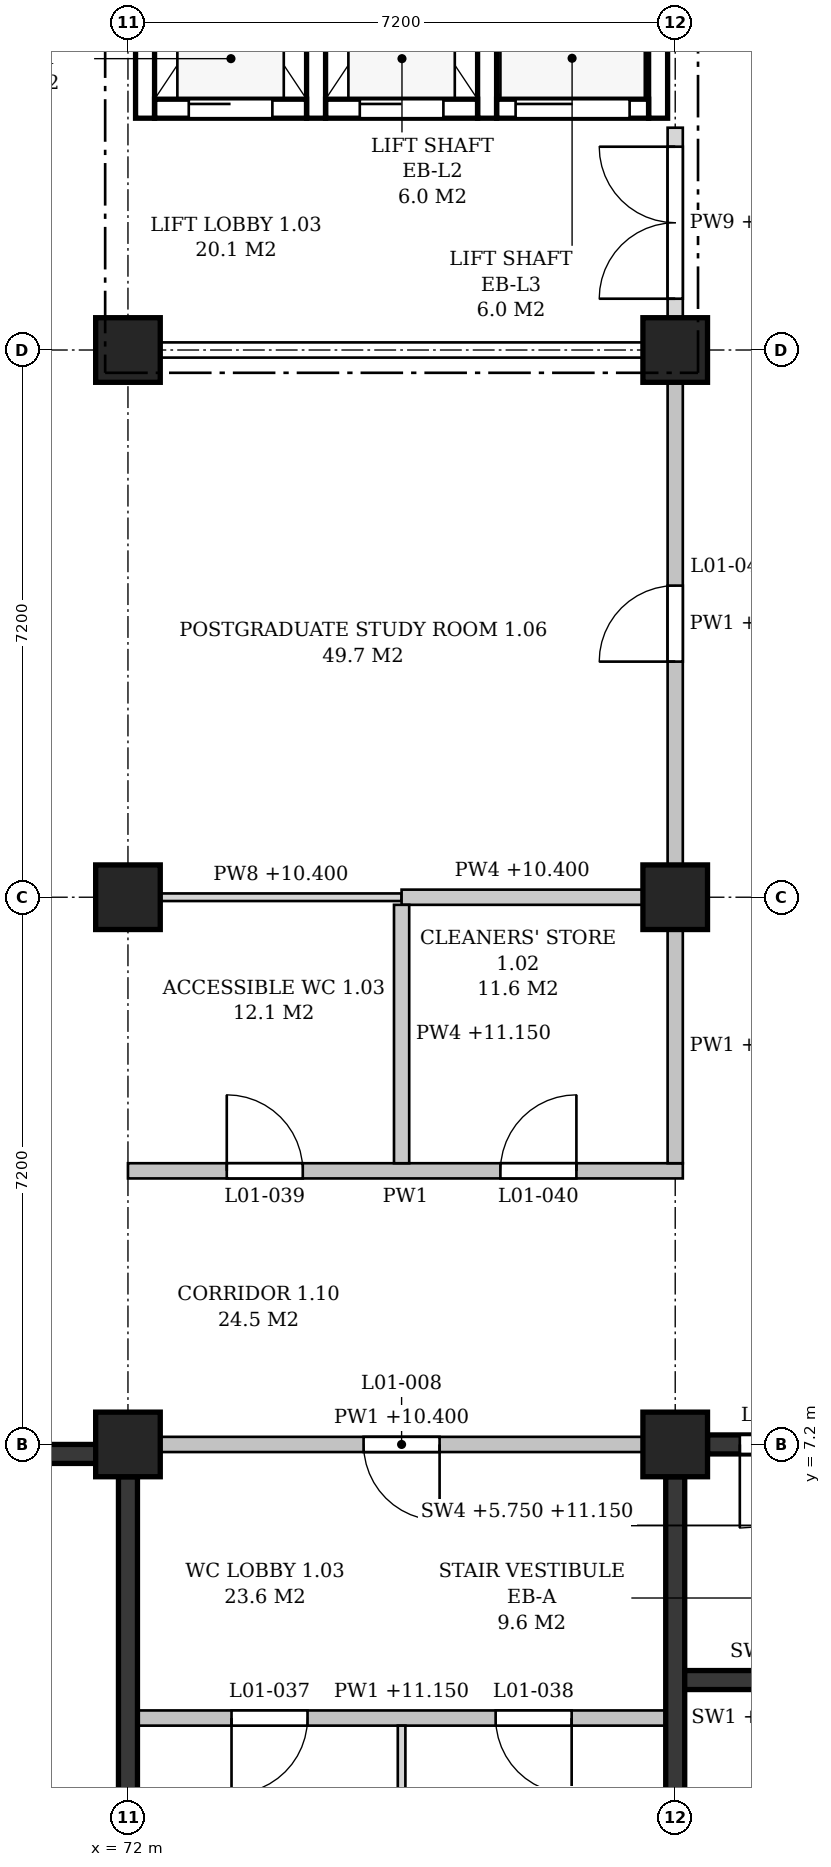
"""IFC4 building model, lengths in metres.
Left out: names, types, materials, properties, quantities, classifications, styles, units other than length and angle.
Written with IfcOpenShell. Run it as: python <this file> out.ifc"""

import sys

from ifc_helpers import new_model, si_unit, direction, frame, frame_2d, origin, origin_2d, place, context, subcontext, project, spatial, polyline, rectangle, outline, extrude, element, fill, save


model = new_model("IFC4")
c1 = context("Model", 3, precision=1e-05, world=origin(), true_north=direction((0.0, 1.0)))
c2 = subcontext(c1, "Body", "Model", "MODEL_VIEW")
j1 = project(units=[si_unit("LENGTHUNIT", "METRE"), si_unit("PLANEANGLEUNIT", "RADIAN")], contexts=[c1])
p1 = place(None, origin())
s1 = spatial("IfcSite", under=j1, at=p1, CompositionType="ELEMENT")
p2 = place(p1, origin())
s2 = spatial("IfcBuilding", under=s1, at=p2, CompositionType="ELEMENT")
p3 = place(p2, frame((0.0, 0.0, 6.0)))
s3 = spatial("IfcBuildingStorey", under=s2, at=p3, CompositionType="ELEMENT", Elevation=6.0)
for number, where, z_axis, x_axis in (
    (1, (72.0, 7.2, 0.0), (0.0, 0.0, 1.0), (1.0, 0.0, 0.0)),
    (2, (72.0, 14.4, 0.0), (0.0, 0.0, 1.0), (1.0, 0.0, 0.0)),
    (3, (72.0, 21.6, 0.0), (0.0, 0.0, 1.0), (1.0, 0.0, 0.0)),
    (4, (79.2, 7.2, 0.0), (0.0, 0.0, 1.0), (1.0, 0.0, 0.0)),
    (5, (79.2, 14.4, 0.0), (0.0, 0.0, 1.0), (1.0, 0.0, 0.0)),
    (6, (79.2, 21.6, 0.0), (0.0, 0.0, 1.0), (1.0, 0.0, 0.0)),
):
    element("IfcColumn", number, at=place(p3, frame(where, z_axis=z_axis, x_axis=x_axis)), inside=s3, PredefinedType="COLUMN", context=c2, shape_type="SweptSolid", body=[
        extrude(rectangle(XDim=0.85, YDim=0.85, at=origin_2d()), origin(), (0.0, 0.0, 1.0), 5.4),
    ])
p4 = place(p3, frame((79.625, 7.2, 0.0), z_axis=(0.0, 0.0, 1.0), x_axis=(1.0, 0.0, 0.0)))
e7 = element("IfcWall", 7, at=p4, inside=s3, PredefinedType="SHEAR", context=c2, shape_type="SweptSolid", body=[
    extrude(rectangle(XDim=6.35, YDim=0.25, at=frame_2d((3.175, 0.0))), origin(), (0.0, 0.0, 1.0), 4.4),
])
p5 = place(p4, frame((0.425, 0.0, 0.0)))
e8 = element("IfcOpeningElement", 8, at=p5, cuts=e7, PredefinedType="OPENING", context=c2, shape_type="SweptSolid", body=[
    extrude(rectangle(XDim=1.1, YDim=2.1, at=frame_2d((0.55, 1.05))), frame((0.0, 0.135, 0.0), z_axis=(0.0, -1.0, 0.0), x_axis=(1.0, 0.0, 0.0)), (0.0, 0.0, 1.0), 0.27),
])
p6 = place(p3, frame((79.2, 0.425, 0.0), z_axis=(0.0, 0.0, 1.0), x_axis=(0.0, 1.0, 0.0)))
e9 = element("IfcWall", 9, at=p6, inside=s3, PredefinedType="SHEAR", context=c2, shape_type="SweptSolid", body=[
    extrude(rectangle(XDim=6.35, YDim=0.25, at=frame_2d((3.175, 0.0))), origin(), (0.0, 0.0, 1.0), 4.4),
])
p7 = place(p3, frame((79.325, 4.1, 0.0), z_axis=(0.0, 0.0, 1.0), x_axis=(1.0, 0.0, 0.0)))
e10 = element("IfcWall", 10, at=p7, inside=s3, PredefinedType="SHEAR", context=c2, shape_type="SweptSolid", body=[
    extrude(rectangle(XDim=2.975, YDim=0.25, at=frame_2d((1.488, 0.0))), origin(), (0.0, 0.0, 1.0), 5.15),
])
p8 = place(p7, frame((1.525, 0.0, 0.0)))
e11 = element("IfcOpeningElement", 11, at=p8, cuts=e10, PredefinedType="OPENING", context=c2, shape_type="SweptSolid", body=[
    extrude(rectangle(XDim=0.9, YDim=2.1, at=frame_2d((0.45, 1.05))), frame((0.0, 0.135, 0.0), z_axis=(0.0, -1.0, 0.0), x_axis=(1.0, 0.0, 0.0)), (0.0, 0.0, 1.0), 0.27),
])
p9 = place(p3, frame((65.225, 7.075, 0.0), z_axis=(0.0, 0.0, 1.0), x_axis=(1.0, 0.0, 0.0)))
e12 = element("IfcWall", 12, at=p9, inside=s3, PredefinedType="SHEAR", context=c2, shape_type="SweptSolid", body=[
    extrude(rectangle(XDim=6.35, YDim=0.25, at=frame_2d((3.175, 0.0))), origin(), (0.0, 0.0, 1.0), 4.7),
])
p10 = place(p3, frame((72.0, 0.425, 0.0), z_axis=(0.0, 0.0, 1.0), x_axis=(0.0, 1.0, 0.0)))
e13 = element("IfcWall", 13, at=p10, inside=s3, PredefinedType="SHEAR", context=c2, shape_type="SweptSolid", body=[
    extrude(rectangle(XDim=6.35, YDim=0.25, at=frame_2d((3.175, 0.0))), origin(), (0.0, 0.0, 1.0), 4.55),
])
p11 = place(p3, frame((72.225, 24.65, -0.25), z_axis=(0.0, 0.0, 1.0), x_axis=(0.0, 1.0, 0.0)))
e14 = element("IfcWall", 14, at=p11, inside=s3, PredefinedType="SHEAR", context=c2, shape_type="SweptSolid", body=[
    extrude(rectangle(XDim=3.725, YDim=0.25, at=frame_2d((1.863, 0.0))), origin(), (0.0, 0.0, 1.0), 5.4),
])
for number, where, z_axis, x_axis in (
    (15, (74.475, 24.65, -0.25), (0.0, 0.0, 1.0), (0.0, 1.0, 0.0)),
    (16, (76.725, 24.65, -0.25), (0.0, 0.0, 1.0), (0.0, 1.0, 0.0)),
):
    element("IfcWall", number, at=place(p3, frame(where, z_axis=z_axis, x_axis=x_axis)), inside=s3, PredefinedType="SHEAR", context=c2, shape_type="SweptSolid", body=[
        extrude(rectangle(XDim=3.5, YDim=0.25, at=frame_2d((1.75, 0.0))), origin(), (0.0, 0.0, 1.0), 5.4),
    ])
p12 = place(p3, frame((78.975, 24.65, -0.25), z_axis=(0.0, 0.0, 1.0), x_axis=(0.0, 1.0, 0.0)))
e17 = element("IfcWall", 17, at=p12, inside=s3, PredefinedType="SHEAR", context=c2, shape_type="SweptSolid", body=[
    extrude(rectangle(XDim=3.725, YDim=0.25, at=frame_2d((1.863, 0.0))), origin(), (0.0, 0.0, 1.0), 5.4),
])
p13 = place(p3, frame((72.35, 24.775, -0.25), z_axis=(0.0, 0.0, 1.0), x_axis=(1.0, 0.0, 0.0)))
e18 = element("IfcWall", 18, at=p13, inside=s3, PredefinedType="SHEAR", context=c2, shape_type="SweptSolid", body=[
    extrude(rectangle(XDim=2.0, YDim=0.25, at=frame_2d((1.0, 0.0))), origin(), (0.0, 0.0, 1.0), 5.4),
])
p14 = place(p13, frame((0.45, 0.0, 0.25)))
e19 = element("IfcOpeningElement", 19, at=p14, cuts=e18, PredefinedType="OPENING", context=c2, shape_type="SweptSolid", body=[
    extrude(rectangle(XDim=1.1, YDim=2.1, at=frame_2d((0.55, 1.05))), frame((0.0, 0.135, 0.0), z_axis=(0.0, -1.0, 0.0), x_axis=(1.0, 0.0, 0.0)), (0.0, 0.0, 1.0), 0.27),
])
p15 = place(p3, frame((74.6, 24.775, -0.25), z_axis=(0.0, 0.0, 1.0), x_axis=(1.0, 0.0, 0.0)))
e20 = element("IfcWall", 20, at=p15, inside=s3, PredefinedType="SHEAR", context=c2, shape_type="SweptSolid", body=[
    extrude(rectangle(XDim=2.0, YDim=0.25, at=frame_2d((1.0, 0.0))), origin(), (0.0, 0.0, 1.0), 5.4),
])
p16 = place(p15, frame((0.45, 0.0, 0.25)))
e21 = element("IfcOpeningElement", 21, at=p16, cuts=e20, PredefinedType="OPENING", context=c2, shape_type="SweptSolid", body=[
    extrude(rectangle(XDim=1.1, YDim=2.1, at=frame_2d((0.55, 1.05))), frame((0.0, 0.135, 0.0), z_axis=(0.0, -1.0, 0.0), x_axis=(1.0, 0.0, 0.0)), (0.0, 0.0, 1.0), 0.27),
])
p17 = place(p3, frame((76.85, 24.775, -0.25), z_axis=(0.0, 0.0, 1.0), x_axis=(1.0, 0.0, 0.0)))
e22 = element("IfcWall", 22, at=p17, inside=s3, PredefinedType="SHEAR", context=c2, shape_type="SweptSolid", body=[
    extrude(rectangle(XDim=2.0, YDim=0.25, at=frame_2d((1.0, 0.0))), origin(), (0.0, 0.0, 1.0), 5.4),
])
p18 = place(p17, frame((0.25, 0.0, 0.25)))
e23 = element("IfcOpeningElement", 23, at=p18, cuts=e22, PredefinedType="OPENING", context=c2, shape_type="SweptSolid", body=[
    extrude(rectangle(XDim=1.5, YDim=2.1, at=frame_2d((0.75, 1.05))), frame((0.0, 0.135, 0.0), z_axis=(0.0, -1.0, 0.0), x_axis=(1.0, 0.0, 0.0)), (0.0, 0.0, 1.0), 0.27),
])
p19 = place(p2, origin())
s4 = spatial("IfcBuildingStorey", under=s2, at=p19, CompositionType="ELEMENT", Elevation=0.0)
for number, where, z_axis, x_axis in (
    (24, (65.225, 7.4, 0.0), (0.0, 0.0, 1.0), (1.0, 0.0, 0.0)),
    (25, (65.225, 21.4, 0.0), (0.0, 0.0, 1.0), (1.0, 0.0, 0.0)),
    (26, (65.225, 21.8, 0.0), (0.0, 0.0, 1.0), (1.0, 0.0, 0.0)),
):
    element("IfcWall", number, at=place(p19, frame(where, z_axis=z_axis, x_axis=x_axis)), inside=s4, PredefinedType="SOLIDWALL", context=c2, shape_type="SweptSolid", body=[
        extrude(rectangle(XDim=6.35, YDim=0.4, at=frame_2d((3.175, 0.0))), origin(), (0.0, 0.0, 1.0), 10.7),
    ])
for number, where, z_axis, x_axis in (
    (27, (71.8, 7.625, 0.0), (0.0, 0.0, 1.0), (0.0, 1.0, 0.0)),
    (28, (71.8, 14.825, 0.0), (0.0, 0.0, 1.0), (0.0, 1.0, 0.0)),
    (29, (71.8, 22.025, 0.0), (0.0, 0.0, 1.0), (0.0, 1.0, 0.0)),
):
    element("IfcWall", number, at=place(p19, frame(where, z_axis=z_axis, x_axis=x_axis)), inside=s4, PredefinedType="SOLIDWALL", context=c2, shape_type="SweptSolid", body=[
        extrude(rectangle(XDim=6.35, YDim=0.4, at=frame_2d((3.175, 0.0))), origin(), (0.0, 0.0, 1.0), 10.55),
    ])
p20 = place(p3, frame((72.125, 3.6, 0.0), z_axis=(0.0, 0.0, 1.0), x_axis=(1.0, 0.0, 0.0)))
e30 = element("IfcWall", 30, at=p20, inside=s3, PredefinedType="PARTITIONING", context=c2, shape_type="SweptSolid", body=[
    extrude(outline(polyline([(0.0, 0.0), (6.95, 0.0), (6.95, 4.4), (6.825, 4.4), (6.825, 5.15), (0.125, 5.15), (0.125, 4.55), (0.0, 4.55), (0.0, 0.0)])), frame((0.0, 0.1, 0.0), z_axis=(0.0, -1.0, 0.0), x_axis=(1.0, 0.0, 0.0)), (0.0, 0.0, 1.0), 0.2),
])
p21 = place(p20, frame((1.238, 0.0, 0.0)))
e31 = element("IfcOpeningElement", 31, at=p21, cuts=e30, PredefinedType="OPENING", context=c2, shape_type="SweptSolid", body=[
    extrude(rectangle(XDim=1.0, YDim=2.1, at=frame_2d((0.5, 1.05))), frame((0.0, 0.11, 0.0), z_axis=(0.0, -1.0, 0.0), x_axis=(1.0, 0.0, 0.0)), (0.0, 0.0, 1.0), 0.22),
])
p22 = place(p20, frame((4.712, 0.0, 0.0)))
e32 = element("IfcOpeningElement", 32, at=p22, cuts=e30, PredefinedType="OPENING", context=c2, shape_type="SweptSolid", body=[
    extrude(rectangle(XDim=1.0, YDim=2.1, at=frame_2d((0.5, 1.05))), frame((0.0, 0.11, 0.0), z_axis=(0.0, -1.0, 0.0), x_axis=(1.0, 0.0, 0.0)), (0.0, 0.0, 1.0), 0.22),
])
p23 = place(p3, frame((72.425, 7.2, 0.0), z_axis=(0.0, 0.0, 1.0), x_axis=(1.0, 0.0, 0.0)))
e33 = element("IfcWall", 33, at=p23, inside=s3, PredefinedType="PARTITIONING", context=c2, shape_type="SweptSolid", body=[
    extrude(rectangle(XDim=6.35, YDim=0.2, at=frame_2d((3.175, 0.0))), origin(), (0.0, 0.0, 1.0), 4.4),
])
p24 = place(p23, frame((2.675, 0.0, 0.0)))
e34 = element("IfcOpeningElement", 34, at=p24, cuts=e33, PredefinedType="OPENING", context=c2, shape_type="SweptSolid", body=[
    extrude(rectangle(XDim=1.0, YDim=2.1, at=frame_2d((0.5, 1.05))), frame((0.0, 0.11, 0.0), z_axis=(0.0, -1.0, 0.0), x_axis=(1.0, 0.0, 0.0)), (0.0, 0.0, 1.0), 0.22),
])
p25 = place(p3, frame((72.0, 10.8, 0.0), z_axis=(0.0, 0.0, 1.0), x_axis=(1.0, 0.0, 0.0)))
e35 = element("IfcWall", 35, at=p25, inside=s3, PredefinedType="PARTITIONING", context=c2, shape_type="SweptSolid", body=[
    extrude(outline(polyline([(0.0, 0.0), (7.3, 0.0), (7.3, 4.4), (6.95, 4.4), (6.95, 4.7), (0.25, 4.7), (0.25, 4.55), (0.0, 4.55), (0.0, 0.0)])), frame((0.0, 0.1, 0.0), z_axis=(0.0, -1.0, 0.0), x_axis=(1.0, 0.0, 0.0)), (0.0, 0.0, 1.0), 0.2),
])
p26 = place(p25, frame((1.3, 0.0, 0.0)))
e36 = element("IfcOpeningElement", 36, at=p26, cuts=e35, PredefinedType="OPENING", context=c2, shape_type="SweptSolid", body=[
    extrude(rectangle(XDim=1.0, YDim=2.1, at=frame_2d((0.5, 1.05))), frame((0.0, 0.11, 0.0), z_axis=(0.0, -1.0, 0.0), x_axis=(1.0, 0.0, 0.0)), (0.0, 0.0, 1.0), 0.22),
])
p27 = place(p25, frame((4.9, 0.0, 0.0)))
e37 = element("IfcOpeningElement", 37, at=p27, cuts=e35, PredefinedType="OPENING", context=c2, shape_type="SweptSolid", body=[
    extrude(rectangle(XDim=1.0, YDim=2.1, at=frame_2d((0.5, 1.05))), frame((0.0, 0.11, 0.0), z_axis=(0.0, -1.0, 0.0), x_axis=(1.0, 0.0, 0.0)), (0.0, 0.0, 1.0), 0.22),
])
p28 = place(p3, frame((72.425, 14.4, 0.0), z_axis=(0.0, 0.0, 1.0), x_axis=(1.0, 0.0, 0.0)))
e38 = element("IfcWall", 38, at=p28, inside=s3, PredefinedType="PARTITIONING", context=c2, shape_type="SweptSolid", body=[
    extrude(rectangle(XDim=3.175, YDim=0.1, at=frame_2d((1.587, 0.0))), origin(), (0.0, 0.0, 1.0), 4.4),
])
p29 = place(p3, frame((75.6, 14.4, 0.0), z_axis=(0.0, 0.0, 1.0), x_axis=(1.0, 0.0, 0.0)))
e39 = element("IfcWall", 39, at=p29, inside=s3, PredefinedType="PARTITIONING", context=c2, shape_type="SweptSolid", body=[
    extrude(rectangle(XDim=3.175, YDim=0.2, at=frame_2d((1.587, 0.0))), origin(), (0.0, 0.0, 1.0), 4.4),
])
p30 = place(p3, frame((72.425, 21.6, 0.0), z_axis=(0.0, 0.0, 1.0), x_axis=(1.0, 0.0, 0.0)))
e40 = element("IfcWall", 40, at=p30, inside=s3, PredefinedType="PARTITIONING", context=c2, shape_type="SweptSolid", body=[
    extrude(rectangle(XDim=6.35, YDim=0.2, at=frame_2d((3.175, 0.0))), origin(), (0.0, 0.0, 1.0), 4.4),
])
p31 = place(p3, frame((75.6, 0.15, 0.0), z_axis=(0.0, 0.0, 1.0), x_axis=(0.0, 1.0, 0.0)))
e41 = element("IfcWall", 41, at=p31, inside=s3, PredefinedType="PARTITIONING", context=c2, shape_type="SweptSolid", body=[
    extrude(rectangle(XDim=3.35, YDim=0.1, at=frame_2d((1.675, 0.0))), origin(), (0.0, 0.0, 1.0), 4.4),
])
p32 = place(p3, frame((75.6, 10.9, 0.0), z_axis=(0.0, 0.0, 1.0), x_axis=(0.0, 1.0, 0.0)))
e42 = element("IfcWall", 42, at=p32, inside=s3, PredefinedType="PARTITIONING", context=c2, shape_type="SweptSolid", body=[
    extrude(outline(polyline([(0.0, 0.0), (3.4, 0.0), (3.4, 4.4), (3.25, 4.4), (3.25, 5.15), (0.0, 5.15), (0.0, 0.0)])), frame((0.0, 0.1, 0.0), z_axis=(0.0, -1.0, 0.0), x_axis=(1.0, 0.0, 0.0)), (0.0, 0.0, 1.0), 0.2),
])
p33 = place(p3, frame((79.2, 10.9, 0.0), z_axis=(0.0, 0.0, 1.0), x_axis=(0.0, 1.0, 0.0)))
e43 = element("IfcWall", 43, at=p33, inside=s3, PredefinedType="PARTITIONING", context=c2, shape_type="SweptSolid", body=[
    extrude(rectangle(XDim=3.075, YDim=0.2, at=frame_2d((1.538, 0.0))), origin(), (0.0, 0.0, 1.0), 4.4),
])
p34 = place(p3, frame((79.2, 14.825, 0.0), z_axis=(0.0, 0.0, 1.0), x_axis=(0.0, 1.0, 0.0)))
e44 = element("IfcWall", 44, at=p34, inside=s3, PredefinedType="PARTITIONING", context=c2, shape_type="SweptSolid", body=[
    extrude(rectangle(XDim=6.35, YDim=0.2, at=frame_2d((3.175, 0.0))), origin(), (0.0, 0.0, 1.0), 4.4),
])
p35 = place(p34, frame((2.675, 0.0, 0.0)))
e45 = element("IfcOpeningElement", 45, at=p35, cuts=e44, PredefinedType="OPENING", context=c2, shape_type="SweptSolid", body=[
    extrude(rectangle(XDim=1.0, YDim=2.1, at=frame_2d((0.5, 1.05))), frame((0.0, 0.11, 0.0), z_axis=(0.0, -1.0, 0.0), x_axis=(1.0, 0.0, 0.0)), (0.0, 0.0, 1.0), 0.22),
])
p36 = place(p3, frame((79.2, 22.025, 0.0), z_axis=(0.0, 0.0, 1.0), x_axis=(0.0, 1.0, 0.0)))
e46 = element("IfcWall", 46, at=p36, inside=s3, PredefinedType="PARTITIONING", context=c2, shape_type="SweptSolid", body=[
    extrude(rectangle(XDim=2.5, YDim=0.2, at=frame_2d((1.25, 0.0))), origin(), (0.0, 0.0, 1.0), 4.4),
])
p37 = place(p36, frame((0.25, 0.0, 0.0)))
e47 = element("IfcOpeningElement", 47, at=p37, cuts=e46, PredefinedType="OPENING", context=c2, shape_type="SweptSolid", body=[
    extrude(rectangle(XDim=2.0, YDim=2.4, at=frame_2d((1.0, 1.2))), frame((0.0, 0.11, 0.0), z_axis=(0.0, -1.0, 0.0), x_axis=(1.0, 0.0, 0.0)), (0.0, 0.0, 1.0), 0.22),
])
p38 = place(p5, frame((1.1, 0.0, 0.0), z_axis=(0.0, 0.0, 1.0), x_axis=(-1.0, 0.0, 0.0)))
e48 = element("IfcDoor", 48, at=p38, inside=s3, OperationType="SINGLE_SWING_RIGHT", PredefinedType="DOOR", context=c2, shape_type="SweptSolid", body=[
    extrude(rectangle(XDim=1.1, YDim=2.1, at=frame_2d((0.55, 1.05))), frame((0.0, 0.025, 0.0), z_axis=(0.0, -1.0, 0.0), x_axis=(1.0, 0.0, 0.0)), (0.0, 0.0, 1.0), 0.05),
])
fill(e8, e48)
p39 = place(p14, origin())
e49 = element("IfcDoor", 49, at=p39, inside=s3, OperationType="SLIDING_TO_LEFT", PredefinedType="DOOR", context=c2, shape_type="SweptSolid", body=[
    extrude(rectangle(XDim=1.1, YDim=2.1, at=frame_2d((0.55, 1.05))), frame((0.0, 0.025, 0.0), z_axis=(0.0, -1.0, 0.0), x_axis=(1.0, 0.0, 0.0)), (0.0, 0.0, 1.0), 0.05),
])
fill(e19, e49)
p40 = place(p16, origin())
e50 = element("IfcDoor", 50, at=p40, inside=s3, OperationType="SLIDING_TO_LEFT", PredefinedType="DOOR", context=c2, shape_type="SweptSolid", body=[
    extrude(rectangle(XDim=1.1, YDim=2.1, at=frame_2d((0.55, 1.05))), frame((0.0, 0.025, 0.0), z_axis=(0.0, -1.0, 0.0), x_axis=(1.0, 0.0, 0.0)), (0.0, 0.0, 1.0), 0.05),
])
fill(e21, e50)
p41 = place(p18, origin())
e51 = element("IfcDoor", 51, at=p41, inside=s3, OperationType="SLIDING_TO_LEFT", PredefinedType="DOOR", context=c2, shape_type="SweptSolid", body=[
    extrude(rectangle(XDim=1.5, YDim=2.1, at=frame_2d((0.75, 1.05))), frame((0.0, 0.025, 0.0), z_axis=(0.0, -1.0, 0.0), x_axis=(1.0, 0.0, 0.0)), (0.0, 0.0, 1.0), 0.05),
])
fill(e23, e51)
p42 = place(p37, origin())
e52 = element("IfcDoor", 52, at=p42, inside=s3, OperationType="DOUBLE_DOOR_SINGLE_SWING", PredefinedType="DOOR", context=c2, shape_type="SweptSolid", body=[
    extrude(rectangle(XDim=2.0, YDim=2.4, at=frame_2d((1.0, 1.2))), frame((0.0, 0.025, 0.0), z_axis=(0.0, -1.0, 0.0), x_axis=(1.0, 0.0, 0.0)), (0.0, 0.0, 1.0), 0.05),
])
fill(e47, e52)
p43 = place(p24, frame((1.0, 0.0, 0.0), z_axis=(0.0, 0.0, 1.0), x_axis=(-1.0, 0.0, 0.0)))
e53 = element("IfcDoor", 53, at=p43, inside=s3, OperationType="SINGLE_SWING_LEFT", PredefinedType="DOOR", context=c2, shape_type="SweptSolid", body=[
    extrude(rectangle(XDim=1.0, YDim=2.1, at=frame_2d((0.5, 1.05))), frame((0.0, 0.025, 0.0), z_axis=(0.0, -1.0, 0.0), x_axis=(1.0, 0.0, 0.0)), (0.0, 0.0, 1.0), 0.05),
])
fill(e34, e53)
p44 = place(p21, frame((1.0, 0.0, 0.0), z_axis=(0.0, 0.0, 1.0), x_axis=(-1.0, 0.0, 0.0)))
e54 = element("IfcDoor", 54, at=p44, inside=s3, OperationType="SINGLE_SWING_RIGHT", PredefinedType="DOOR", context=c2, shape_type="SweptSolid", body=[
    extrude(rectangle(XDim=1.0, YDim=2.1, at=frame_2d((0.5, 1.05))), frame((0.0, 0.025, 0.0), z_axis=(0.0, -1.0, 0.0), x_axis=(1.0, 0.0, 0.0)), (0.0, 0.0, 1.0), 0.05),
])
fill(e31, e54)
p45 = place(p22, frame((1.0, 0.0, 0.0), z_axis=(0.0, 0.0, 1.0), x_axis=(-1.0, 0.0, 0.0)))
e55 = element("IfcDoor", 55, at=p45, inside=s3, OperationType="SINGLE_SWING_LEFT", PredefinedType="DOOR", context=c2, shape_type="SweptSolid", body=[
    extrude(rectangle(XDim=1.0, YDim=2.1, at=frame_2d((0.5, 1.05))), frame((0.0, 0.025, 0.0), z_axis=(0.0, -1.0, 0.0), x_axis=(1.0, 0.0, 0.0)), (0.0, 0.0, 1.0), 0.05),
])
fill(e32, e55)
p46 = place(p26, origin())
e56 = element("IfcDoor", 56, at=p46, inside=s3, OperationType="SINGLE_SWING_LEFT", PredefinedType="DOOR", context=c2, shape_type="SweptSolid", body=[
    extrude(rectangle(XDim=1.0, YDim=2.1, at=frame_2d((0.5, 1.05))), frame((0.0, 0.025, 0.0), z_axis=(0.0, -1.0, 0.0), x_axis=(1.0, 0.0, 0.0)), (0.0, 0.0, 1.0), 0.05),
])
fill(e36, e56)
p47 = place(p27, origin())
e57 = element("IfcDoor", 57, at=p47, inside=s3, OperationType="SINGLE_SWING_RIGHT", PredefinedType="DOOR", context=c2, shape_type="SweptSolid", body=[
    extrude(rectangle(XDim=1.0, YDim=2.1, at=frame_2d((0.5, 1.05))), frame((0.0, 0.025, 0.0), z_axis=(0.0, -1.0, 0.0), x_axis=(1.0, 0.0, 0.0)), (0.0, 0.0, 1.0), 0.05),
])
fill(e37, e57)
p48 = place(p35, origin())
e58 = element("IfcDoor", 58, at=p48, inside=s3, OperationType="SINGLE_SWING_LEFT", PredefinedType="DOOR", context=c2, shape_type="SweptSolid", body=[
    extrude(rectangle(XDim=1.0, YDim=2.1, at=frame_2d((0.5, 1.05))), frame((0.0, 0.025, 0.0), z_axis=(0.0, -1.0, 0.0), x_axis=(1.0, 0.0, 0.0)), (0.0, 0.0, 1.0), 0.05),
])
fill(e45, e58)
save(model, sys.argv[1])
